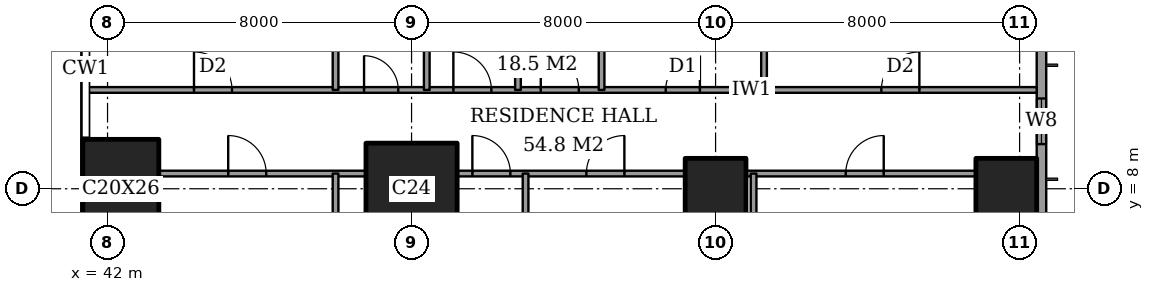
"""IFC4 building model, lengths in metres.
Left out: names, types, materials, properties, quantities, classifications, styles, units other than length and angle.
Written with IfcOpenShell. Run it as: python <this file> out.ifc"""

import sys

from ifc_helpers import new_model, si_unit, direction, frame, frame_2d, origin, origin_2d, place, context, subcontext, project, spatial, rectangle, extrude, element, fill, save


model = new_model("IFC4")
c1 = context("Model", 3, precision=1e-05, world=origin(), true_north=direction((0.0, 1.0)))
c2 = subcontext(c1, "Body", "Model", "MODEL_VIEW")
j1 = project(units=[si_unit("LENGTHUNIT", "METRE"), si_unit("PLANEANGLEUNIT", "RADIAN")], contexts=[c1])
p1 = place(None, origin())
s1 = spatial("IfcSite", under=j1, at=p1, CompositionType="ELEMENT")
p2 = place(p1, origin())
s2 = spatial("IfcBuilding", under=s1, at=p2, CompositionType="ELEMENT")
p3 = place(p2, frame((0.0, 0.0, 241.2)))
s3 = spatial("IfcBuildingStorey", under=s2, at=p3, CompositionType="ELEMENT", Elevation=241.2)
p4 = place(p3, frame((42.35, 8.0, 0.0), z_axis=(0.0, 0.0, 1.0), x_axis=(1.0, 0.0, 0.0)))
e1 = element("IfcColumn", 1, at=p4, inside=s3, PredefinedType="COLUMN", context=c2, shape_type="SweptSolid", body=[
    extrude(rectangle(XDim=2.0, YDim=2.6, at=origin_2d()), origin(), (0.0, 0.0, 1.0), 3.6),
])
p5 = place(p3, frame((50.0, 8.0, 0.0), z_axis=(0.0, 0.0, 1.0), x_axis=(1.0, 0.0, 0.0)))
e2 = element("IfcColumn", 2, at=p5, inside=s3, PredefinedType="COLUMN", context=c2, shape_type="SweptSolid", body=[
    extrude(rectangle(XDim=2.4, YDim=2.4, at=origin_2d()), origin(), (0.0, 0.0, 1.0), 3.6),
])
for number, where, z_axis, x_axis in (
    (3, (58.0, 8.0, 0.0), (0.0, 0.0, 1.0), (1.0, 0.0, 0.0)),
    (4, (65.65, 8.0, 0.0), (0.0, 0.0, 1.0), (1.0, 0.0, 0.0)),
):
    element("IfcColumn", number, at=place(p3, frame(where, z_axis=z_axis, x_axis=x_axis)), inside=s3, PredefinedType="COLUMN", context=c2, shape_type="SweptSolid", body=[
        extrude(rectangle(XDim=1.6, YDim=1.6, at=origin_2d()), origin(), (0.0, 0.0, 1.0), 3.6),
    ])
p6 = place(p3, frame((66.575, 3.175, 0.0), z_axis=(0.0, 0.0, 1.0), x_axis=(0.0, 1.0, 0.0)))
e5 = element("IfcWall", 5, at=p6, inside=s3, PredefinedType="SOLIDWALL", context=c2, shape_type="SweptSolid", body=[
    extrude(rectangle(XDim=41.65, YDim=0.25, at=frame_2d((20.825, 0.0))), origin(), (0.0, 0.0, 1.0), 3.6),
])
p7 = place(p6, frame((0.875, 0.0, 0.6)))
e6 = element("IfcOpeningElement", 6, at=p7, cuts=e5, PredefinedType="OPENING", context=c2, shape_type="SweptSolid", body=[
    extrude(rectangle(XDim=2.4, YDim=2.0, at=frame_2d((1.2, 1.0))), frame((0.0, 0.135, 0.0), z_axis=(0.0, -1.0, 0.0), x_axis=(1.0, 0.0, 0.0)), (0.0, 0.0, 1.0), 0.27),
])
p8 = place(p6, frame((6.0, 0.0, 0.6)))
e7 = element("IfcOpeningElement", 7, at=p8, cuts=e5, PredefinedType="OPENING", context=c2, shape_type="SweptSolid", body=[
    extrude(rectangle(XDim=1.2, YDim=2.0, at=frame_2d((0.6, 1.0))), frame((0.0, 0.135, 0.0), z_axis=(0.0, -1.0, 0.0), x_axis=(1.0, 0.0, 0.0)), (0.0, 0.0, 1.0), 0.27),
])
p9 = place(p6, frame((8.525, 0.0, 0.6)))
e8 = element("IfcOpeningElement", 8, at=p9, cuts=e5, PredefinedType="OPENING", context=c2, shape_type="SweptSolid", body=[
    extrude(rectangle(XDim=2.4, YDim=2.0, at=frame_2d((1.2, 1.0))), frame((0.0, 0.135, 0.0), z_axis=(0.0, -1.0, 0.0), x_axis=(1.0, 0.0, 0.0)), (0.0, 0.0, 1.0), 0.27),
])
p10 = place(p6, frame((15.725, 0.0, 0.6)))
e9 = element("IfcOpeningElement", 9, at=p10, cuts=e5, PredefinedType="OPENING", context=c2, shape_type="SweptSolid", body=[
    extrude(rectangle(XDim=2.4, YDim=2.0, at=frame_2d((1.2, 1.0))), frame((0.0, 0.135, 0.0), z_axis=(0.0, -1.0, 0.0), x_axis=(1.0, 0.0, 0.0)), (0.0, 0.0, 1.0), 0.27),
])
p11 = place(p6, frame((23.525, 0.0, 0.6)))
e10 = element("IfcOpeningElement", 10, at=p11, cuts=e5, PredefinedType="OPENING", context=c2, shape_type="SweptSolid", body=[
    extrude(rectangle(XDim=2.4, YDim=2.0, at=frame_2d((1.2, 1.0))), frame((0.0, 0.135, 0.0), z_axis=(0.0, -1.0, 0.0), x_axis=(1.0, 0.0, 0.0)), (0.0, 0.0, 1.0), 0.27),
])
p12 = place(p6, frame((30.625, 0.0, 0.6)))
e11 = element("IfcOpeningElement", 11, at=p12, cuts=e5, PredefinedType="OPENING", context=c2, shape_type="SweptSolid", body=[
    extrude(rectangle(XDim=2.4, YDim=2.0, at=frame_2d((1.2, 1.0))), frame((0.0, 0.135, 0.0), z_axis=(0.0, -1.0, 0.0), x_axis=(1.0, 0.0, 0.0)), (0.0, 0.0, 1.0), 0.27),
])
p13 = place(p6, frame((34.325, 0.0, 0.6)))
e12 = element("IfcOpeningElement", 12, at=p13, cuts=e5, PredefinedType="OPENING", context=c2, shape_type="SweptSolid", body=[
    extrude(rectangle(XDim=1.2, YDim=2.0, at=frame_2d((0.6, 1.0))), frame((0.0, 0.135, 0.0), z_axis=(0.0, -1.0, 0.0), x_axis=(1.0, 0.0, 0.0)), (0.0, 0.0, 1.0), 0.27),
])
p14 = place(p6, frame((38.375, 0.0, 0.6)))
e13 = element("IfcOpeningElement", 13, at=p14, cuts=e5, PredefinedType="OPENING", context=c2, shape_type="SweptSolid", body=[
    extrude(rectangle(XDim=2.4, YDim=2.0, at=frame_2d((1.2, 1.0))), frame((0.0, 0.135, 0.0), z_axis=(0.0, -1.0, 0.0), x_axis=(1.0, 0.0, 0.0)), (0.0, 0.0, 1.0), 0.27),
])
p15 = place(p3, frame((43.35, 8.4, 0.0), z_axis=(0.0, 0.0, 1.0), x_axis=(1.0, 0.0, 0.0)))
e14 = element("IfcWall", 14, at=p15, inside=s3, PredefinedType="PARTITIONING", context=c2, shape_type="SweptSolid", body=[
    extrude(rectangle(XDim=5.45, YDim=0.15, at=frame_2d((2.725, 0.0))), origin(), (0.0, 0.0, 1.0), 3.35),
])
p16 = place(p15, frame((1.825, 0.0, 0.0)))
e15 = element("IfcOpeningElement", 15, at=p16, cuts=e14, PredefinedType="OPENING", context=c2, shape_type="SweptSolid", body=[
    extrude(rectangle(XDim=1.0, YDim=2.1, at=frame_2d((0.5, 1.05))), frame((0.0, 0.085, 0.0), z_axis=(0.0, -1.0, 0.0), x_axis=(1.0, 0.0, 0.0)), (0.0, 0.0, 1.0), 0.17),
])
p17 = place(p3, frame((51.2, 8.4, 0.0), z_axis=(0.0, 0.0, 1.0), x_axis=(1.0, 0.0, 0.0)))
e16 = element("IfcWall", 16, at=p17, inside=s3, PredefinedType="PARTITIONING", context=c2, shape_type="SweptSolid", body=[
    extrude(rectangle(XDim=6.0, YDim=0.15, at=frame_2d((3.0, 0.0))), origin(), (0.0, 0.0, 1.0), 3.35),
])
p18 = place(p17, frame((3.4, 0.0, 0.0)))
e17 = element("IfcOpeningElement", 17, at=p18, cuts=e16, PredefinedType="OPENING", context=c2, shape_type="SweptSolid", body=[
    extrude(rectangle(XDim=1.0, YDim=2.1, at=frame_2d((0.5, 1.05))), frame((0.0, 0.085, 0.0), z_axis=(0.0, -1.0, 0.0), x_axis=(1.0, 0.0, 0.0)), (0.0, 0.0, 1.0), 0.17),
])
p19 = place(p17, frame((0.4, 0.0, 0.0)))
e18 = element("IfcOpeningElement", 18, at=p19, cuts=e16, PredefinedType="OPENING", context=c2, shape_type="SweptSolid", body=[
    extrude(rectangle(XDim=1.0, YDim=2.1, at=frame_2d((0.5, 1.05))), frame((0.0, 0.085, 0.0), z_axis=(0.0, -1.0, 0.0), x_axis=(1.0, 0.0, 0.0)), (0.0, 0.0, 1.0), 0.17),
])
p20 = place(p3, frame((58.8, 8.4, 0.0), z_axis=(0.0, 0.0, 1.0), x_axis=(1.0, 0.0, 0.0)))
e19 = element("IfcWall", 19, at=p20, inside=s3, PredefinedType="PARTITIONING", context=c2, shape_type="SweptSolid", body=[
    extrude(rectangle(XDim=6.05, YDim=0.15, at=frame_2d((3.025, 0.0))), origin(), (0.0, 0.0, 1.0), 3.35),
])
p21 = place(p20, frame((2.625, 0.0, 0.0)))
e20 = element("IfcOpeningElement", 20, at=p21, cuts=e19, PredefinedType="OPENING", context=c2, shape_type="SweptSolid", body=[
    extrude(rectangle(XDim=1.0, YDim=2.1, at=frame_2d((0.5, 1.05))), frame((0.0, 0.085, 0.0), z_axis=(0.0, -1.0, 0.0), x_axis=(1.0, 0.0, 0.0)), (0.0, 0.0, 1.0), 0.17),
])
p22 = place(p3, frame((41.439, 10.6, 0.0), z_axis=(0.0, 0.0, 1.0), x_axis=(1.0, 0.0, 0.0)))
e21 = element("IfcWall", 21, at=p22, inside=s3, PredefinedType="PARTITIONING", context=c2, shape_type="SweptSolid", body=[
    extrude(rectangle(XDim=25.011, YDim=0.15, at=frame_2d((12.505, 0.0))), origin(), (0.0, 0.0, 1.0), 3.35),
])
p23 = place(p22, frame((11.961, 0.0, 0.0)))
e22 = element("IfcOpeningElement", 22, at=p23, cuts=e21, PredefinedType="OPENING", context=c2, shape_type="SweptSolid", body=[
    extrude(rectangle(XDim=1.0, YDim=2.1, at=frame_2d((0.5, 1.05))), frame((0.0, 0.085, 0.0), z_axis=(0.0, -1.0, 0.0), x_axis=(1.0, 0.0, 0.0)), (0.0, 0.0, 1.0), 0.17),
])
p24 = place(p22, frame((20.924, 0.0, 0.0)))
e23 = element("IfcOpeningElement", 23, at=p24, cuts=e21, PredefinedType="OPENING", context=c2, shape_type="SweptSolid", body=[
    extrude(rectangle(XDim=1.0, YDim=2.1, at=frame_2d((0.5, 1.05))), frame((0.0, 0.085, 0.0), z_axis=(0.0, -1.0, 0.0), x_axis=(1.0, 0.0, 0.0)), (0.0, 0.0, 1.0), 0.17),
])
p25 = place(p22, frame((15.249, 0.0, 0.0)))
e24 = element("IfcOpeningElement", 24, at=p25, cuts=e21, PredefinedType="OPENING", context=c2, shape_type="SweptSolid", body=[
    extrude(rectangle(XDim=0.9, YDim=2.1, at=frame_2d((0.45, 1.05))), frame((0.0, 0.085, 0.0), z_axis=(0.0, -1.0, 0.0), x_axis=(1.0, 0.0, 0.0)), (0.0, 0.0, 1.0), 0.17),
])
p26 = place(p22, frame((9.661, 0.0, 0.0)))
e25 = element("IfcOpeningElement", 25, at=p26, cuts=e21, PredefinedType="OPENING", context=c2, shape_type="SweptSolid", body=[
    extrude(rectangle(XDim=1.0, YDim=2.1, at=frame_2d((0.5, 1.05))), frame((0.0, 0.085, 0.0), z_axis=(0.0, -1.0, 0.0), x_axis=(1.0, 0.0, 0.0)), (0.0, 0.0, 1.0), 0.17),
])
p27 = place(p22, frame((7.311, 0.0, 0.0)))
e26 = element("IfcOpeningElement", 26, at=p27, cuts=e21, PredefinedType="OPENING", context=c2, shape_type="SweptSolid", body=[
    extrude(rectangle(XDim=0.9, YDim=2.1, at=frame_2d((0.45, 1.05))), frame((0.0, 0.085, 0.0), z_axis=(0.0, -1.0, 0.0), x_axis=(1.0, 0.0, 0.0)), (0.0, 0.0, 1.0), 0.17),
])
p28 = place(p22, frame((2.836, 0.0, 0.0)))
e27 = element("IfcOpeningElement", 27, at=p28, cuts=e21, PredefinedType="OPENING", context=c2, shape_type="SweptSolid", body=[
    extrude(rectangle(XDim=1.0, YDim=2.1, at=frame_2d((0.5, 1.05))), frame((0.0, 0.085, 0.0), z_axis=(0.0, -1.0, 0.0), x_axis=(1.0, 0.0, 0.0)), (0.0, 0.0, 1.0), 0.17),
])
p29 = place(p3, frame((48.0, -0.45, 0.0), z_axis=(0.0, 0.0, 1.0), x_axis=(0.0, 1.0, 0.0)))
e28 = element("IfcWall", 28, at=p29, inside=s3, PredefinedType="PARTITIONING", context=c2, shape_type="SweptSolid", body=[
    extrude(rectangle(XDim=8.85, YDim=0.15, at=frame_2d((4.425, 0.0))), origin(), (0.0, 0.0, 1.0), 3.35),
])
p30 = place(p3, frame((48.0, 10.6, 0.0), z_axis=(0.0, 0.0, 1.0), x_axis=(0.0, 1.0, 0.0)))
e29 = element("IfcWall", 29, at=p30, inside=s3, PredefinedType="PARTITIONING", context=c2, shape_type="SweptSolid", body=[
    extrude(rectangle(XDim=8.4, YDim=0.15, at=frame_2d((4.2, 0.0))), origin(), (0.0, 0.0, 1.0), 3.35),
])
p31 = place(p30, frame((6.7, 0.0, 0.0)))
e30 = element("IfcOpeningElement", 30, at=p31, cuts=e29, PredefinedType="OPENING", context=c2, shape_type="SweptSolid", body=[
    extrude(rectangle(XDim=0.9, YDim=2.1, at=frame_2d((0.45, 1.05))), frame((0.0, 0.085, 0.0), z_axis=(0.0, -1.0, 0.0), x_axis=(1.0, 0.0, 0.0)), (0.0, 0.0, 1.0), 0.17),
])
p32 = place(p3, frame((50.4, 10.6, 0.0), z_axis=(0.0, 0.0, 1.0), x_axis=(0.0, 1.0, 0.0)))
e31 = element("IfcWall", 31, at=p32, inside=s3, PredefinedType="PARTITIONING", context=c2, shape_type="SweptSolid", body=[
    extrude(rectangle(XDim=4.2, YDim=0.15, at=frame_2d((2.1, 0.0))), origin(), (0.0, 0.0, 1.0), 3.35),
])
p33 = place(p3, frame((52.8, 10.6, 0.0), z_axis=(0.0, 0.0, 1.0), x_axis=(0.0, 1.0, 0.0)))
e32 = element("IfcWall", 32, at=p33, inside=s3, PredefinedType="PARTITIONING", context=c2, shape_type="SweptSolid", body=[
    extrude(rectangle(XDim=8.4, YDim=0.15, at=frame_2d((4.2, 0.0))), origin(), (0.0, 0.0, 1.0), 3.35),
])
p34 = place(p3, frame((53.0, -0.45, 0.0), z_axis=(0.0, 0.0, 1.0), x_axis=(0.0, 1.0, 0.0)))
e33 = element("IfcWall", 33, at=p34, inside=s3, PredefinedType="PARTITIONING", context=c2, shape_type="SweptSolid", body=[
    extrude(rectangle(XDim=8.85, YDim=0.15, at=frame_2d((4.425, 0.0))), origin(), (0.0, 0.0, 1.0), 3.35),
])
p35 = place(p3, frame((55.0, 10.6, 0.0), z_axis=(0.0, 0.0, 1.0), x_axis=(0.0, 1.0, 0.0)))
e34 = element("IfcWall", 34, at=p35, inside=s3, PredefinedType="PARTITIONING", context=c2, shape_type="SweptSolid", body=[
    extrude(rectangle(XDim=11.0, YDim=0.15, at=frame_2d((5.5, 0.0))), origin(), (0.0, 0.0, 1.0), 3.35),
])
p36 = place(p35, frame((9.2, 0.0, 0.0)))
e35 = element("IfcOpeningElement", 35, at=p36, cuts=e34, PredefinedType="OPENING", context=c2, shape_type="SweptSolid", body=[
    extrude(rectangle(XDim=1.0, YDim=2.1, at=frame_2d((0.5, 1.05))), frame((0.0, 0.085, 0.0), z_axis=(0.0, -1.0, 0.0), x_axis=(1.0, 0.0, 0.0)), (0.0, 0.0, 1.0), 0.17),
])
p37 = place(p3, frame((59.0, -0.45, 0.0), z_axis=(0.0, 0.0, 1.0), x_axis=(0.0, 1.0, 0.0)))
e36 = element("IfcWall", 36, at=p37, inside=s3, PredefinedType="PARTITIONING", context=c2, shape_type="SweptSolid", body=[
    extrude(rectangle(XDim=8.85, YDim=0.15, at=frame_2d((4.425, 0.0))), origin(), (0.0, 0.0, 1.0), 3.35),
])
p38 = place(p3, frame((59.275, 10.6, 0.0), z_axis=(0.0, 0.0, 1.0), x_axis=(0.0, 1.0, 0.0)))
e37 = element("IfcWall", 37, at=p38, inside=s3, PredefinedType="PARTITIONING", context=c2, shape_type="SweptSolid", body=[
    extrude(rectangle(XDim=4.2, YDim=0.15, at=frame_2d((2.1, 0.0))), origin(), (0.0, 0.0, 1.0), 3.35),
])
p39 = place(p8, origin())
e38 = element("IfcWindow", 38, at=p39, inside=s3, PartitioningType="SINGLE_PANEL", PredefinedType="WINDOW", context=c2, shape_type="SweptSolid", body=[
    extrude(rectangle(XDim=1.2, YDim=2.0, at=frame_2d((0.6, 1.0))), frame((0.0, 0.03, 0.0), z_axis=(0.0, -1.0, 0.0), x_axis=(1.0, 0.0, 0.0)), (0.0, 0.0, 1.0), 0.06),
])
fill(e7, e38)
p40 = place(p21, origin())
e39 = element("IfcDoor", 39, at=p40, inside=s3, OperationType="SINGLE_SWING_LEFT", PredefinedType="DOOR", context=c2, shape_type="SweptSolid", body=[
    extrude(rectangle(XDim=1.0, YDim=2.1, at=frame_2d((0.5, 1.05))), frame((0.0, 0.025, 0.0), z_axis=(0.0, -1.0, 0.0), x_axis=(1.0, 0.0, 0.0)), (0.0, 0.0, 1.0), 0.05),
])
fill(e20, e39)
p41 = place(p18, origin())
e40 = element("IfcDoor", 40, at=p41, inside=s3, OperationType="SINGLE_SWING_LEFT", PredefinedType="DOOR", context=c2, shape_type="SweptSolid", body=[
    extrude(rectangle(XDim=1.0, YDim=2.1, at=frame_2d((0.5, 1.05))), frame((0.0, 0.025, 0.0), z_axis=(0.0, -1.0, 0.0), x_axis=(1.0, 0.0, 0.0)), (0.0, 0.0, 1.0), 0.05),
])
fill(e17, e40)
p42 = place(p19, origin())
e41 = element("IfcDoor", 41, at=p42, inside=s3, OperationType="SINGLE_SWING_RIGHT", PredefinedType="DOOR", context=c2, shape_type="SweptSolid", body=[
    extrude(rectangle(XDim=1.0, YDim=2.1, at=frame_2d((0.5, 1.05))), frame((0.0, 0.025, 0.0), z_axis=(0.0, -1.0, 0.0), x_axis=(1.0, 0.0, 0.0)), (0.0, 0.0, 1.0), 0.05),
])
fill(e18, e41)
p43 = place(p16, origin())
e42 = element("IfcDoor", 42, at=p43, inside=s3, OperationType="SINGLE_SWING_RIGHT", PredefinedType="DOOR", context=c2, shape_type="SweptSolid", body=[
    extrude(rectangle(XDim=1.0, YDim=2.1, at=frame_2d((0.5, 1.05))), frame((0.0, 0.025, 0.0), z_axis=(0.0, -1.0, 0.0), x_axis=(1.0, 0.0, 0.0)), (0.0, 0.0, 1.0), 0.05),
])
fill(e15, e42)
p44 = place(p23, origin())
e43 = element("IfcDoor", 43, at=p44, inside=s3, OperationType="SINGLE_SWING_RIGHT", PredefinedType="DOOR", context=c2, shape_type="SweptSolid", body=[
    extrude(rectangle(XDim=1.0, YDim=2.1, at=frame_2d((0.5, 1.05))), frame((0.0, 0.025, 0.0), z_axis=(0.0, -1.0, 0.0), x_axis=(1.0, 0.0, 0.0)), (0.0, 0.0, 1.0), 0.05),
])
fill(e22, e43)
p45 = place(p24, origin())
e44 = element("IfcDoor", 44, at=p45, inside=s3, OperationType="SINGLE_SWING_LEFT", PredefinedType="DOOR", context=c2, shape_type="SweptSolid", body=[
    extrude(rectangle(XDim=1.0, YDim=2.1, at=frame_2d((0.5, 1.05))), frame((0.0, 0.025, 0.0), z_axis=(0.0, -1.0, 0.0), x_axis=(1.0, 0.0, 0.0)), (0.0, 0.0, 1.0), 0.05),
])
fill(e23, e44)
p46 = place(p25, origin())
e45 = element("IfcDoor", 45, at=p46, inside=s3, OperationType="SINGLE_SWING_LEFT", PredefinedType="DOOR", context=c2, shape_type="SweptSolid", body=[
    extrude(rectangle(XDim=0.9, YDim=2.1, at=frame_2d((0.45, 1.05))), frame((0.0, 0.025, 0.0), z_axis=(0.0, -1.0, 0.0), x_axis=(1.0, 0.0, 0.0)), (0.0, 0.0, 1.0), 0.05),
])
fill(e24, e45)
p47 = place(p26, origin())
e46 = element("IfcDoor", 46, at=p47, inside=s3, OperationType="SINGLE_SWING_RIGHT", PredefinedType="DOOR", context=c2, shape_type="SweptSolid", body=[
    extrude(rectangle(XDim=1.0, YDim=2.1, at=frame_2d((0.5, 1.05))), frame((0.0, 0.025, 0.0), z_axis=(0.0, -1.0, 0.0), x_axis=(1.0, 0.0, 0.0)), (0.0, 0.0, 1.0), 0.05),
])
fill(e25, e46)
p48 = place(p27, origin())
e47 = element("IfcDoor", 47, at=p48, inside=s3, OperationType="SINGLE_SWING_RIGHT", PredefinedType="DOOR", context=c2, shape_type="SweptSolid", body=[
    extrude(rectangle(XDim=0.9, YDim=2.1, at=frame_2d((0.45, 1.05))), frame((0.0, 0.025, 0.0), z_axis=(0.0, -1.0, 0.0), x_axis=(1.0, 0.0, 0.0)), (0.0, 0.0, 1.0), 0.05),
])
fill(e26, e47)
p49 = place(p28, origin())
e48 = element("IfcDoor", 48, at=p49, inside=s3, OperationType="SINGLE_SWING_RIGHT", PredefinedType="DOOR", context=c2, shape_type="SweptSolid", body=[
    extrude(rectangle(XDim=1.0, YDim=2.1, at=frame_2d((0.5, 1.05))), frame((0.0, 0.025, 0.0), z_axis=(0.0, -1.0, 0.0), x_axis=(1.0, 0.0, 0.0)), (0.0, 0.0, 1.0), 0.05),
])
fill(e27, e48)
save(model, sys.argv[1])
